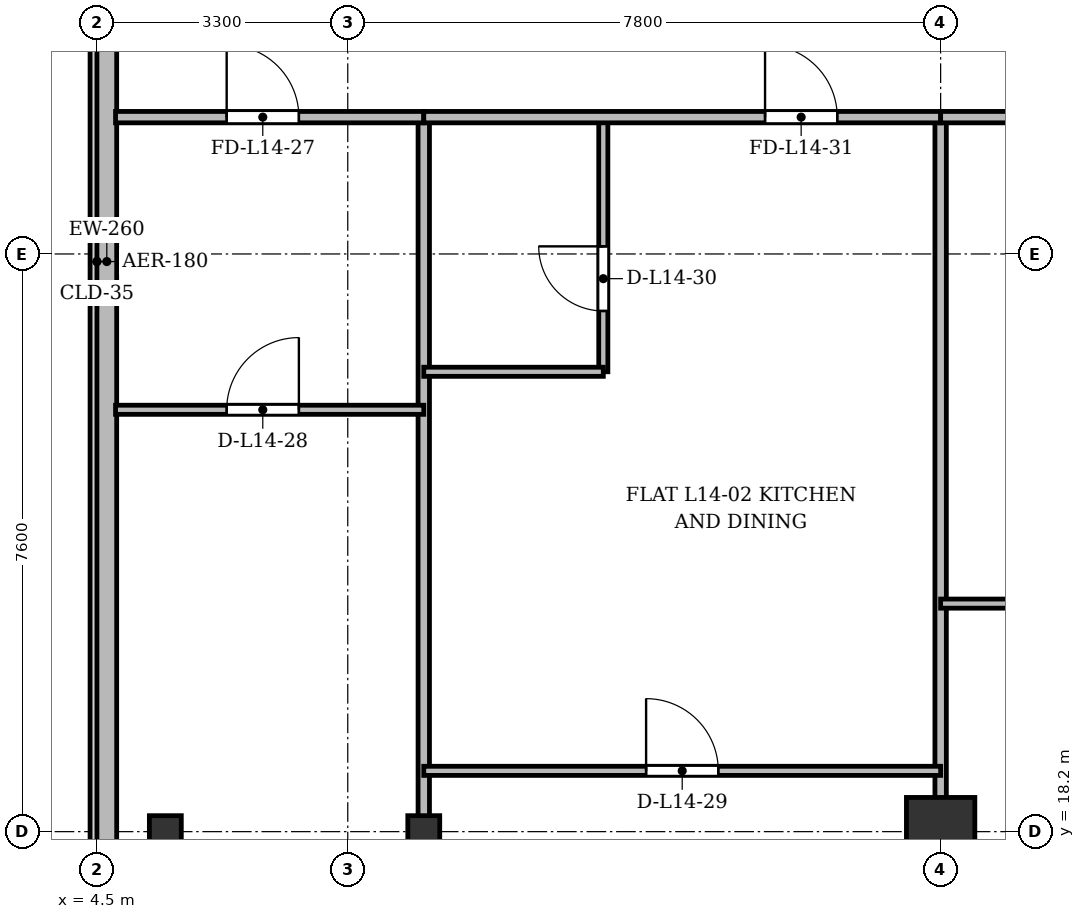
"""IFC4 building model, lengths in metres.
Left out: names, types, materials, properties, quantities, classifications, styles, units other than length and angle.
Written with IfcOpenShell. Run it as: python <this file> out.ifc"""

import sys

from ifc_helpers import new_model, si_unit, direction, frame, frame_2d, origin, origin_2d, place, context, subcontext, project, spatial, rectangle, i_section, extrude, source, transform, mapped, element, fill, save


model = new_model("IFC4")
c1 = context("Model", 3, precision=1e-05, world=origin(), true_north=direction((0.0, 1.0)))
c2 = subcontext(c1, "Body", "Model", "MODEL_VIEW")
j1 = project(units=[si_unit("LENGTHUNIT", "METRE"), si_unit("PLANEANGLEUNIT", "RADIAN")], contexts=[c1])
p1 = place(None, origin())
s1 = spatial("IfcSite", under=j1, at=p1, CompositionType="ELEMENT")
p2 = place(p1, origin())
s2 = spatial("IfcBuilding", under=s1, at=p2, CompositionType="ELEMENT")
p3 = place(p2, frame((0.0, 0.0, 55.9)))
s3 = spatial("IfcBuildingStorey", under=s2, at=p3, CompositionType="ELEMENT", Elevation=55.9)
m1 = source(origin(), c2, "Body", "SweptSolid", [
    extrude(i_section(OverallWidth=0.42, OverallDepth=0.42, WebThickness=0.026, FlangeThickness=0.04, at=origin_2d()), origin(), (0.0, 0.0, 1.0), 3.6),
])
for number, where, z_axis, x_axis in (
    (1, (5.4, 18.2, 0.0), (0.0, 0.0, 1.0), (1.0, 0.0, 0.0)),
    (2, (8.8, 18.2, 0.0), (0.0, 0.0, 1.0), (1.0, 0.0, 0.0)),
):
    element("IfcColumn", number, at=place(p3, frame(where, z_axis=z_axis, x_axis=x_axis)), inside=s3, PredefinedType="COLUMN", context=c2, shape_type="MappedRepresentation", body=[
        mapped(m1, transform((0.0, 0.0, 0.0), x_axis=(1.0, 0.0, 0.0), y_axis=(0.0, 1.0, 0.0), z_axis=(0.0, 0.0, 1.0), scale=1.0)),
    ])
m2 = source(origin(), c2, "Body", "SweptSolid", [
    extrude(rectangle(XDim=0.9, YDim=0.9, at=origin_2d()), origin(), (0.0, 0.0, 1.0), 3.6),
])
p4 = place(p3, frame((15.6, 18.2, 0.0), z_axis=(0.0, 0.0, 1.0), x_axis=(1.0, 0.0, 0.0)))
e3 = element("IfcColumn", 3, at=p4, inside=s3, PredefinedType="COLUMN", context=c2, shape_type="MappedRepresentation", body=[
    mapped(m2, transform((0.0, 0.0, 0.0), x_axis=(1.0, 0.0, 0.0), y_axis=(0.0, 1.0, 0.0), z_axis=(0.0, 0.0, 1.0), scale=1.0)),
])
p5 = place(p3, frame((4.63, 5.9, 0.0), z_axis=(0.0, 0.0, 1.0), x_axis=(0.0, 1.0, 0.0)))
e4 = element("IfcWall", 4, at=p5, inside=s3, PredefinedType="SOLIDWALL", context=c2, shape_type="SweptSolid", body=[
    extrude(rectangle(XDim=39.6, YDim=0.26, at=frame_2d((19.8, 0.0))), origin(), (0.0, 0.0, 1.0), 3.34),
])
p6 = place(p5, frame((1.45, 0.0, 0.92)))
e5 = element("IfcOpeningElement", 5, at=p6, cuts=e4, PredefinedType="OPENING", context=c2, shape_type="SweptSolid", body=[
    extrude(rectangle(XDim=1.2, YDim=1.65, at=frame_2d((0.6, 0.825))), frame((0.0, 0.14, 0.0), z_axis=(0.0, -1.0, 0.0), x_axis=(1.0, 0.0, 0.0)), (0.0, 0.0, 1.0), 0.28),
])
p7 = place(p5, frame((4.2, 0.0, 0.92)))
e6 = element("IfcOpeningElement", 6, at=p7, cuts=e4, PredefinedType="OPENING", context=c2, shape_type="SweptSolid", body=[
    extrude(rectangle(XDim=2.6, YDim=1.9, at=frame_2d((1.3, 0.95))), frame((0.0, 0.14, 0.0), z_axis=(0.0, -1.0, 0.0), x_axis=(1.0, 0.0, 0.0)), (0.0, 0.0, 1.0), 0.28),
])
p8 = place(p5, frame((8.4, 0.0, 0.92)))
e7 = element("IfcOpeningElement", 7, at=p8, cuts=e4, PredefinedType="OPENING", context=c2, shape_type="SweptSolid", body=[
    extrude(rectangle(XDim=2.6, YDim=1.9, at=frame_2d((1.3, 0.95))), frame((0.0, 0.14, 0.0), z_axis=(0.0, -1.0, 0.0), x_axis=(1.0, 0.0, 0.0)), (0.0, 0.0, 1.0), 0.28),
])
p9 = place(p5, frame((29.6, 0.0, 0.92)))
e8 = element("IfcOpeningElement", 8, at=p9, cuts=e4, PredefinedType="OPENING", context=c2, shape_type="SweptSolid", body=[
    extrude(rectangle(XDim=2.6, YDim=1.9, at=frame_2d((1.3, 0.95))), frame((0.0, 0.14, 0.0), z_axis=(0.0, -1.0, 0.0), x_axis=(1.0, 0.0, 0.0)), (0.0, 0.0, 1.0), 0.28),
])
p10 = place(p5, frame((33.9, 0.0, 0.92)))
e9 = element("IfcOpeningElement", 9, at=p10, cuts=e4, PredefinedType="OPENING", context=c2, shape_type="SweptSolid", body=[
    extrude(rectangle(XDim=1.2, YDim=1.65, at=frame_2d((0.6, 0.825))), frame((0.0, 0.14, 0.0), z_axis=(0.0, -1.0, 0.0), x_axis=(1.0, 0.0, 0.0)), (0.0, 0.0, 1.0), 0.28),
])
p11 = place(p5, frame((37.25, 0.0, 0.92)))
e10 = element("IfcOpeningElement", 10, at=p11, cuts=e4, PredefinedType="OPENING", context=c2, shape_type="SweptSolid", body=[
    extrude(rectangle(XDim=1.2, YDim=1.65, at=frame_2d((0.6, 0.825))), frame((0.0, 0.14, 0.0), z_axis=(0.0, -1.0, 0.0), x_axis=(1.0, 0.0, 0.0)), (0.0, 0.0, 1.0), 0.28),
])
for number, where, z_axis, x_axis in (
    (11, (8.8, 3.145, 0.0), (0.0, 0.0, 1.0), (0.0, 1.0, 0.0)),
    (12, (15.6, 3.145, 0.0), (0.0, 0.0, 1.0), (0.0, 1.0, 0.0)),
):
    element("IfcWall", number, at=place(p3, frame(where, z_axis=z_axis, x_axis=x_axis)), inside=s3, PredefinedType="PARTITIONING", context=c2, shape_type="SweptSolid", body=[
        extrude(rectangle(XDim=24.455, YDim=0.15, at=frame_2d((12.228, 0.0))), origin(), (0.0, 0.0, 1.0), 2.752),
    ])
p12 = place(p3, frame((4.745, 27.6, 0.0), z_axis=(0.0, 0.0, 1.0), x_axis=(1.0, 0.0, 0.0)))
e13 = element("IfcWall", 13, at=p12, inside=s3, PredefinedType="PARTITIONING", context=c2, shape_type="SweptSolid", body=[
    extrude(rectangle(XDim=4.055, YDim=0.15, at=frame_2d((2.027, 0.0))), origin(), (0.0, 0.0, 1.0), 2.752),
])
p13 = place(p12, frame((1.462, 0.0, 0.0)))
e14 = element("IfcOpeningElement", 14, at=p13, cuts=e13, PredefinedType="OPENING", context=c2, shape_type="SweptSolid", body=[
    extrude(rectangle(XDim=0.95, YDim=2.15, at=frame_2d((0.475, 1.075))), frame((0.0, 0.085, 0.0), z_axis=(0.0, -1.0, 0.0), x_axis=(1.0, 0.0, 0.0)), (0.0, 0.0, 1.0), 0.17),
])
p14 = place(p3, frame((4.745, 23.75, 0.0), z_axis=(0.0, 0.0, 1.0), x_axis=(1.0, 0.0, 0.0)))
e15 = element("IfcWall", 15, at=p14, inside=s3, PredefinedType="PARTITIONING", context=c2, shape_type="SweptSolid", body=[
    extrude(rectangle(XDim=4.055, YDim=0.12, at=frame_2d((2.027, 0.0))), origin(), (0.0, 0.0, 1.0), 2.752),
])
p15 = place(p14, frame((1.462, 0.0, 0.0)))
e16 = element("IfcOpeningElement", 16, at=p15, cuts=e15, PredefinedType="OPENING", context=c2, shape_type="SweptSolid", body=[
    extrude(rectangle(XDim=0.95, YDim=2.15, at=frame_2d((0.475, 1.075))), frame((0.0, 0.07, 0.0), z_axis=(0.0, -1.0, 0.0), x_axis=(1.0, 0.0, 0.0)), (0.0, 0.0, 1.0), 0.14),
])
p16 = place(p3, frame((8.8, 19.0, 0.0), z_axis=(0.0, 0.0, 1.0), x_axis=(1.0, 0.0, 0.0)))
e17 = element("IfcWall", 17, at=p16, inside=s3, PredefinedType="PARTITIONING", context=c2, shape_type="SweptSolid", body=[
    extrude(rectangle(XDim=6.8, YDim=0.12, at=frame_2d((3.4, 0.0))), origin(), (0.0, 0.0, 1.0), 2.752),
])
p17 = place(p16, frame((2.925, 0.0, 0.0)))
e18 = element("IfcOpeningElement", 18, at=p17, cuts=e17, PredefinedType="OPENING", context=c2, shape_type="SweptSolid", body=[
    extrude(rectangle(XDim=0.95, YDim=2.15, at=frame_2d((0.475, 1.075))), frame((0.0, 0.07, 0.0), z_axis=(0.0, -1.0, 0.0), x_axis=(1.0, 0.0, 0.0)), (0.0, 0.0, 1.0), 0.14),
])
p18 = place(p3, frame((11.162, 24.25, 0.0), z_axis=(0.0, 0.0, 1.0), x_axis=(0.0, 1.0, 0.0)))
e19 = element("IfcWall", 19, at=p18, inside=s3, PredefinedType="PARTITIONING", context=c2, shape_type="SweptSolid", body=[
    extrude(rectangle(XDim=3.35, YDim=0.12, at=frame_2d((1.675, 0.0))), origin(), (0.0, 0.0, 1.0), 2.94),
])
p19 = place(p18, frame((0.8, 0.0, 0.0)))
e20 = element("IfcOpeningElement", 20, at=p19, cuts=e19, PredefinedType="OPENING", context=c2, shape_type="SweptSolid", body=[
    extrude(rectangle(XDim=0.85, YDim=2.1, at=frame_2d((0.425, 1.05))), frame((0.0, 0.07, 0.0), z_axis=(0.0, -1.0, 0.0), x_axis=(1.0, 0.0, 0.0)), (0.0, 0.0, 1.0), 0.14),
])
p20 = place(p3, frame((8.8, 24.25, 0.0), z_axis=(0.0, 0.0, 1.0), x_axis=(1.0, 0.0, 0.0)))
e21 = element("IfcWall", 21, at=p20, inside=s3, PredefinedType="PARTITIONING", context=c2, shape_type="SweptSolid", body=[
    extrude(rectangle(XDim=2.362, YDim=0.12, at=frame_2d((1.181, 0.0))), origin(), (0.0, 0.0, 1.0), 2.752),
])
p21 = place(p3, frame((8.8, 27.6, 0.0), z_axis=(0.0, 0.0, 1.0), x_axis=(1.0, 0.0, 0.0)))
e22 = element("IfcWall", 22, at=p21, inside=s3, PredefinedType="PARTITIONING", context=c2, shape_type="SweptSolid", body=[
    extrude(rectangle(XDim=6.8, YDim=0.15, at=frame_2d((3.4, 0.0))), origin(), (0.0, 0.0, 1.0), 2.752),
])
p22 = place(p21, frame((4.49, 0.0, 0.0)))
e23 = element("IfcOpeningElement", 23, at=p22, cuts=e22, PredefinedType="OPENING", context=c2, shape_type="SweptSolid", body=[
    extrude(rectangle(XDim=0.95, YDim=2.15, at=frame_2d((0.475, 1.075))), frame((0.0, 0.085, 0.0), z_axis=(0.0, -1.0, 0.0), x_axis=(1.0, 0.0, 0.0)), (0.0, 0.0, 1.0), 0.17),
])
p23 = place(p3, frame((15.6, 27.6, 0.0), z_axis=(0.0, 0.0, 1.0), x_axis=(1.0, 0.0, 0.0)))
e24 = element("IfcWall", 24, at=p23, inside=s3, PredefinedType="PARTITIONING", context=c2, shape_type="SweptSolid", body=[
    extrude(rectangle(XDim=7.8, YDim=0.15, at=frame_2d((3.9, 0.0))), origin(), (0.0, 0.0, 1.0), 2.752),
])
p24 = place(p23, frame((3.333, 0.0, 0.0)))
e25 = element("IfcOpeningElement", 25, at=p24, cuts=e24, PredefinedType="OPENING", context=c2, shape_type="SweptSolid", body=[
    extrude(rectangle(XDim=0.95, YDim=2.15, at=frame_2d((0.475, 1.075))), frame((0.0, 0.085, 0.0), z_axis=(0.0, -1.0, 0.0), x_axis=(1.0, 0.0, 0.0)), (0.0, 0.0, 1.0), 0.17),
])
p25 = place(p3, frame((15.6, 21.2, 0.0), z_axis=(0.0, 0.0, 1.0), x_axis=(1.0, 0.0, 0.0)))
e26 = element("IfcWall", 26, at=p25, inside=s3, PredefinedType="PARTITIONING", context=c2, shape_type="SweptSolid", body=[
    extrude(rectangle(XDim=7.8, YDim=0.12, at=frame_2d((3.9, 0.0))), origin(), (0.0, 0.0, 1.0), 2.752),
])
p26 = place(p25, frame((3.333, 0.0, 0.0)))
e27 = element("IfcOpeningElement", 27, at=p26, cuts=e26, PredefinedType="OPENING", context=c2, shape_type="SweptSolid", body=[
    extrude(rectangle(XDim=0.95, YDim=2.15, at=frame_2d((0.475, 1.075))), frame((0.0, 0.07, 0.0), z_axis=(0.0, -1.0, 0.0), x_axis=(1.0, 0.0, 0.0)), (0.0, 0.0, 1.0), 0.14),
])
m3 = source(origin(), c2, "Body", "SweptSolid", [
    extrude(rectangle(XDim=0.95, YDim=2.15, at=frame_2d((0.475, 1.075))), frame((0.0, 0.025, 0.0), z_axis=(0.0, -1.0, 0.0), x_axis=(1.0, 0.0, 0.0)), (0.0, 0.0, 1.0), 0.05),
])
p27 = place(p13, origin())
e28 = element("IfcDoor", 28, at=p27, inside=s3, OperationType="SINGLE_SWING_LEFT", PredefinedType="DOOR", context=c2, shape_type="MappedRepresentation", body=[
    mapped(m3, transform((0.0, 0.0, 0.0), x_axis=(1.0, 0.0, 0.0), y_axis=(0.0, 1.0, 0.0), z_axis=(0.0, 0.0, 1.0), scale=1.0)),
])
fill(e14, e28)
p28 = place(p15, origin())
e29 = element("IfcDoor", 29, at=p28, inside=s3, OperationType="SINGLE_SWING_RIGHT", PredefinedType="DOOR", context=c2, shape_type="MappedRepresentation", body=[
    mapped(m3, transform((0.0, 0.0, 0.0), x_axis=(1.0, 0.0, 0.0), y_axis=(0.0, 1.0, 0.0), z_axis=(0.0, 0.0, 1.0), scale=1.0)),
])
fill(e16, e29)
p29 = place(p17, origin())
e30 = element("IfcDoor", 30, at=p29, inside=s3, OperationType="SINGLE_SWING_LEFT", PredefinedType="DOOR", context=c2, shape_type="MappedRepresentation", body=[
    mapped(m3, transform((0.0, 0.0, 0.0), x_axis=(1.0, 0.0, 0.0), y_axis=(0.0, 1.0, 0.0), z_axis=(0.0, 0.0, 1.0), scale=1.0)),
])
fill(e18, e30)
m4 = source(origin(), c2, "Body", "SweptSolid", [
    extrude(rectangle(XDim=0.85, YDim=2.1, at=frame_2d((0.425, 1.05))), frame((0.0, 0.025, 0.0), z_axis=(0.0, -1.0, 0.0), x_axis=(1.0, 0.0, 0.0)), (0.0, 0.0, 1.0), 0.05),
])
p30 = place(p19, origin())
e31 = element("IfcDoor", 31, at=p30, inside=s3, OperationType="SINGLE_SWING_RIGHT", PredefinedType="DOOR", context=c2, shape_type="MappedRepresentation", body=[
    mapped(m4, transform((0.0, 0.0, 0.0), x_axis=(1.0, 0.0, 0.0), y_axis=(0.0, 1.0, 0.0), z_axis=(0.0, 0.0, 1.0), scale=1.0)),
])
fill(e20, e31)
p31 = place(p22, origin())
e32 = element("IfcDoor", 32, at=p31, inside=s3, OperationType="SINGLE_SWING_LEFT", PredefinedType="DOOR", context=c2, shape_type="MappedRepresentation", body=[
    mapped(m3, transform((0.0, 0.0, 0.0), x_axis=(1.0, 0.0, 0.0), y_axis=(0.0, 1.0, 0.0), z_axis=(0.0, 0.0, 1.0), scale=1.0)),
])
fill(e23, e32)
save(model, sys.argv[1])
